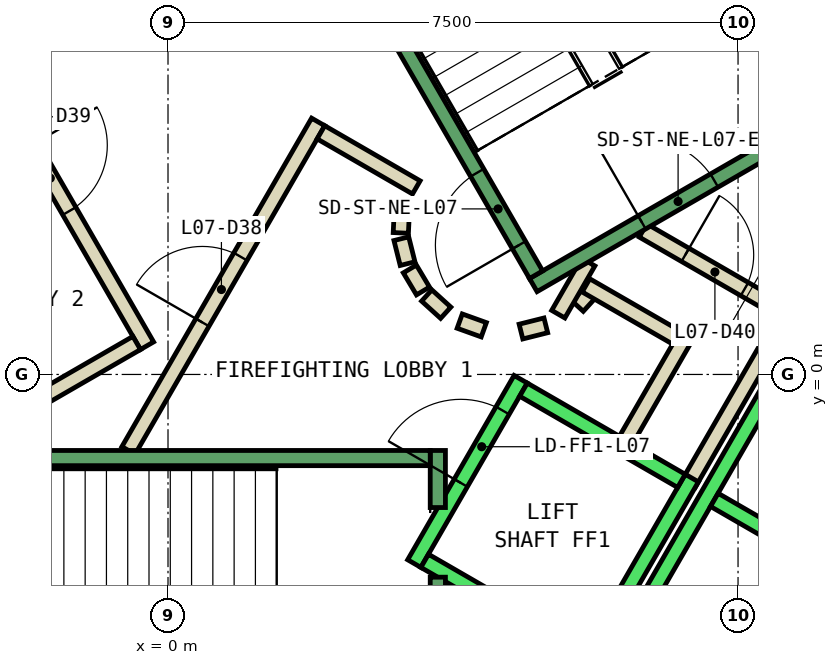
"""IFC4 building model, lengths in metres.
Left out: names, types, materials, properties, quantities, classifications, styles, units other than length and angle.
Written with IfcOpenShell. Run it as: python <this file> out.ifc"""

import sys

from ifc_helpers import new_model, si_unit, direction, frame, frame_2d, origin, place, context, subcontext, project, spatial, polyline, rectangle, outline, extrude, element, fill, save


model = new_model("IFC4")
c1 = context("Model", 3, precision=1e-05, world=origin(), true_north=direction((0.0, 1.0)))
c2 = subcontext(c1, "Body", "Model", "MODEL_VIEW")
j1 = project(units=[si_unit("LENGTHUNIT", "METRE"), si_unit("PLANEANGLEUNIT", "RADIAN")], contexts=[c1])
p1 = place(None, origin())
s1 = spatial("IfcSite", under=j1, at=p1, CompositionType="ELEMENT")
p2 = place(p1, origin())
s2 = spatial("IfcBuilding", under=s1, at=p2, CompositionType="ELEMENT")
p3 = place(p2, frame((0.0, 0.0, 39.2)))
s3 = spatial("IfcBuildingStorey", under=s2, at=p3, CompositionType="ELEMENT", Elevation=39.2)
p4 = place(p3, frame((0.0, 0.0, -0.4)))
e1 = element("IfcWall", 1, at=p4, inside=s3, PredefinedType="SHEAR", context=c2, shape_type="SweptSolid", body=[
    extrude(outline(polyline([(8.517, 11.748), (7.651, 11.248), (12.702, 2.5), (13.856, 2.5), (8.517, 11.748)])), origin(), (0.0, 0.0, 1.0), 4.2),
])
p5 = place(p3, frame((5.39, 0.898, 0.0), z_axis=(0.0, 0.0, 1.0), x_axis=(0.673828488714, 0.738887791073, 0.0)))
e2 = element("IfcWall", 2, at=p5, inside=s3, PredefinedType="PARTITIONING", context=c2, shape_type="SweptSolid", body=[
    extrude(rectangle(XDim=0.263, YDim=0.2, at=frame_2d((0.131, 0.0))), origin(), (0.0, 0.0, 1.0), 3.8),
])
p6 = place(p3, frame((5.499, 1.172, 0.0), z_axis=(0.0, 0.0, 1.0), x_axis=(0.866333505267, -0.499465972466, 0.0)))
e3 = element("IfcWall", 3, at=p6, inside=s3, PredefinedType="PARTITIONING", context=c2, shape_type="SweptSolid", body=[
    extrude(rectangle(XDim=1.374, YDim=0.2, at=frame_2d((0.687, 0.0))), origin(), (0.0, 0.0, 1.0), 3.8),
])
p7 = place(p3, frame((6.826, 0.522, 0.0), z_axis=(0.0, 0.0, 1.0), x_axis=(-0.500016722714, -0.866015748706, 0.0)))
e4 = element("IfcWall", 4, at=p7, inside=s3, PredefinedType="PARTITIONING", context=c2, shape_type="SweptSolid", body=[
    extrude(rectangle(XDim=1.7, YDim=0.2, at=frame_2d((0.85, 0.0))), origin(), (0.0, 0.0, 1.0), 3.8),
])
p8 = place(p3, frame((6.25, 1.894, 0.0), z_axis=(0.0, 0.0, 1.0), x_axis=(0.866043184279, -0.499969202016, 0.0)))
e5 = element("IfcWall", 5, at=p8, inside=s3, PredefinedType="PARTITIONING", context=c2, shape_type="SweptSolid", body=[
    extrude(rectangle(XDim=2.084, YDim=0.2, at=frame_2d((1.042, 0.0))), origin(), (0.0, 0.0, 1.0), 3.8),
])
p9 = place(p8, frame((0.642, 0.0, 0.0)))
e6 = element("IfcOpeningElement", 6, at=p9, cuts=e5, PredefinedType="OPENING", context=c2, shape_type="SweptSolid", body=[
    extrude(rectangle(XDim=0.9, YDim=2.1, at=frame_2d((0.45, 1.05))), frame((0.0, 0.11, 0.0), z_axis=(0.0, -1.0, 0.0), x_axis=(1.0, 0.0, 0.0)), (0.0, 0.0, 1.0), 0.22),
])
p10 = place(p3, frame((8.192, 0.888, 0.0), z_axis=(0.0, 0.0, 1.0), x_axis=(-0.499940625693, -0.866059680843, 0.0)))
e7 = element("IfcWall", 7, at=p10, inside=s3, PredefinedType="PARTITIONING", context=c2, shape_type="SweptSolid", body=[
    extrude(rectangle(XDim=2.68, YDim=0.2, at=frame_2d((1.34, 0.0))), origin(), (0.0, 0.0, 1.0), 3.8),
])
p11 = place(p3, frame((5.135, 0.793, 0.0), z_axis=(0.0, 0.0, 1.0), x_axis=(0.499526442893, 0.866298639529, 0.0)))
e8 = element("IfcWall", 8, at=p11, inside=s3, PredefinedType="PARTITIONING", context=c2, shape_type="SweptSolid", body=[
    extrude(rectangle(XDim=0.791, YDim=0.2, at=frame_2d((0.396, 0.0))), origin(), (0.0, 0.0, 1.0), 3.8),
])
p12 = place(p3, frame((-0.52, -1.0, 0.0), z_axis=(0.0, 0.0, 1.0), x_axis=(0.50011622646, 0.865958290007, 0.0)))
e9 = element("IfcWall", 9, at=p12, inside=s3, PredefinedType="PARTITIONING", context=c2, shape_type="SweptSolid", body=[
    extrude(rectangle(XDim=4.991, YDim=0.2, at=frame_2d((2.496, 0.0))), origin(), (0.0, 0.0, 1.0), 3.8),
])
p13 = place(p12, frame((1.945, 0.0, 0.0)))
e10 = element("IfcOpeningElement", 10, at=p13, cuts=e9, PredefinedType="OPENING", context=c2, shape_type="SweptSolid", body=[
    extrude(rectangle(XDim=1.0, YDim=2.1, at=frame_2d((0.5, 1.05))), frame((0.0, 0.11, 0.0), z_axis=(0.0, -1.0, 0.0), x_axis=(1.0, 0.0, 0.0)), (0.0, 0.0, 1.0), 0.22),
])
p14 = place(p3, frame((2.012, 3.186, 0.0), z_axis=(0.0, 0.0, 1.0), x_axis=(0.865891012941, -0.500232699559, 0.0)))
e11 = element("IfcWall", 11, at=p14, inside=s3, PredefinedType="PARTITIONING", context=c2, shape_type="SweptSolid", body=[
    extrude(rectangle(XDim=1.449, YDim=0.2, at=frame_2d((0.725, 0.0))), origin(), (0.0, 0.0, 1.0), 3.8),
])
p15 = place(p3, frame((3.079, 2.199, 0.0), z_axis=(0.0, 0.0, 1.0), x_axis=(-0.047771483479, -0.998858290933, 0.0)))
e12 = element("IfcWall", 12, at=p15, inside=s3, PredefinedType="PARTITIONING", context=c2, shape_type="SweptSolid", body=[
    extrude(rectangle(XDim=0.337, YDim=0.2, at=frame_2d((0.169, 0.0))), origin(), (0.0, 0.0, 1.0), 3.8),
])
p16 = place(p3, frame((3.07, 1.786, 0.0), z_axis=(0.0, 0.0, 1.0), x_axis=(0.242705583207, -0.970099994784, 0.0)))
e13 = element("IfcWall", 13, at=p16, inside=s3, PredefinedType="PARTITIONING", context=c2, shape_type="SweptSolid", body=[
    extrude(rectangle(XDim=0.338, YDim=0.2, at=frame_2d((0.169, 0.0))), origin(), (0.0, 0.0, 1.0), 3.8),
])
for number, where, z_axis, x_axis in (
    (14, (3.182, 1.388, 0.0), (0.0, 0.0, 1.0), (0.512, -0.859, 0.0)),
    (15, (3.404, 1.039, 0.0), (0.0, 0.0, 1.0), (0.74, -0.672, 0.0)),
):
    element("IfcWall", number, at=place(p3, frame(where, z_axis=z_axis, x_axis=x_axis)), inside=s3, PredefinedType="PARTITIONING", context=c2, shape_type="SweptSolid", body=[
        extrude(rectangle(XDim=0.338, YDim=0.2, at=frame_2d((0.169, 0.0))), origin(), (0.0, 0.0, 1.0), 3.8),
    ])
p17 = place(p3, frame((3.838, 0.702, 0.0), z_axis=(0.0, 0.0, 1.0), x_axis=(0.941035081519, -0.338308993895, 0.0)))
e16 = element("IfcWall", 16, at=p17, inside=s3, PredefinedType="PARTITIONING", context=c2, shape_type="SweptSolid", body=[
    extrude(rectangle(XDim=0.337, YDim=0.2, at=frame_2d((0.168, 0.0))), origin(), (0.0, 0.0, 1.0), 3.8),
])
p18 = place(p3, frame((4.644, 0.564, 0.0), z_axis=(0.0, 0.0, 1.0), x_axis=(0.969929076366, 0.243387729394, 0.0)))
e17 = element("IfcWall", 17, at=p18, inside=s3, PredefinedType="PARTITIONING", context=c2, shape_type="SweptSolid", body=[
    extrude(rectangle(XDim=0.337, YDim=0.2, at=frame_2d((0.168, 0.0))), origin(), (0.0, 0.0, 1.0), 3.8),
])
p19 = place(p3, frame((-2.771, 4.7, 0.0), z_axis=(0.0, 0.0, 1.0), x_axis=(0.499969479948, -0.866043023828, 0.0)))
e18 = element("IfcWall", 18, at=p19, inside=s3, PredefinedType="PARTITIONING", context=c2, shape_type="SweptSolid", body=[
    extrude(rectangle(XDim=4.99, YDim=0.2, at=frame_2d((2.495, 0.0))), origin(), (0.0, 0.0, 1.0), 3.8),
])
p20 = place(p19, frame((1.945, 0.0, 0.0)))
e19 = element("IfcOpeningElement", 19, at=p20, cuts=e18, PredefinedType="OPENING", context=c2, shape_type="SweptSolid", body=[
    extrude(rectangle(XDim=1.0, YDim=2.1, at=frame_2d((0.5, 1.05))), frame((0.0, 0.11, 0.0), z_axis=(0.0, -1.0, 0.0), x_axis=(1.0, 0.0, 0.0)), (0.0, 0.0, 1.0), 0.22),
])
p21 = place(p3, frame((-0.412, 0.414, 0.0), z_axis=(0.0, 0.0, 1.0), x_axis=(-0.866017369001, -0.500013916395, 0.0)))
e20 = element("IfcWall", 20, at=p21, inside=s3, PredefinedType="PARTITIONING", context=c2, shape_type="SweptSolid", body=[
    extrude(rectangle(XDim=1.45, YDim=0.2, at=frame_2d((0.725, 0.0))), origin(), (0.0, 0.0, 1.0), 3.8),
])
p22 = place(p3, frame((3.24, -2.488, 0.0), z_axis=(0.0, 0.0, 1.0), x_axis=(0.49994636267, 0.866056369097, 0.0)))
e21 = element("IfcWall", 21, at=p22, inside=s3, PredefinedType="STANDARD", context=c2, shape_type="SweptSolid", body=[
    extrude(rectangle(XDim=2.8, YDim=0.2, at=frame_2d((1.4, 0.0))), origin(), (0.0, 0.0, 1.0), 3.8),
])
p23 = place(p22, frame((1.225, 0.0, 0.0)))
e22 = element("IfcOpeningElement", 22, at=p23, cuts=e21, PredefinedType="OPENING", context=c2, shape_type="SweptSolid", body=[
    extrude(rectangle(XDim=1.1, YDim=2.1, at=frame_2d((0.55, 1.05))), frame((0.0, 0.11, 0.0), z_axis=(0.0, -1.0, 0.0), x_axis=(1.0, 0.0, 0.0)), (0.0, 0.0, 1.0), 0.22),
])
p24 = place(p3, frame((5.492, -3.788, 0.0), z_axis=(0.0, 0.0, 1.0), x_axis=(0.500011755427, 0.866018616679, 0.0)))
e23 = element("IfcWall", 23, at=p24, inside=s3, PredefinedType="STANDARD", context=c2, shape_type="SweptSolid", body=[
    extrude(rectangle(XDim=2.8, YDim=0.2, at=frame_2d((1.4, 0.0))), origin(), (0.0, 0.0, 1.0), 3.8),
])
p25 = place(p3, frame((3.377, -2.452, 0.0), z_axis=(0.0, 0.0, 1.0), x_axis=(0.865955154139, -0.50012165622, 0.0)))
e24 = element("IfcWall", 24, at=p25, inside=s3, PredefinedType="STANDARD", context=c2, shape_type="SweptSolid", body=[
    extrude(rectangle(XDim=2.4, YDim=0.2, at=frame_2d((1.2, 0.0))), origin(), (0.0, 0.0, 1.0), 3.8),
])
p26 = place(p3, frame((4.677, -0.2, 0.0), z_axis=(0.0, 0.0, 1.0), x_axis=(0.865973769406, -0.500089422704, 0.0)))
e25 = element("IfcWall", 25, at=p26, inside=s3, PredefinedType="STANDARD", context=c2, shape_type="SweptSolid", body=[
    extrude(rectangle(XDim=2.399, YDim=0.2, at=frame_2d((1.2, 0.0))), origin(), (0.0, 0.0, 1.0), 3.8),
])
p27 = place(p3, frame((4.451, -6.19, 0.0), z_axis=(0.0, 0.0, 1.0), x_axis=(0.50000090737, 0.866024879913, 0.0)))
e26 = element("IfcWall", 26, at=p27, inside=s3, PredefinedType="STANDARD", context=c2, shape_type="SweptSolid", body=[
    extrude(rectangle(XDim=10.6, YDim=0.2, at=frame_2d((5.3, 0.0))), origin(), (0.0, 0.0, 1.0), 3.8),
])
p28 = place(p3, frame((7.188, -1.65, 0.0), z_axis=(0.0, 0.0, 1.0), x_axis=(0.866022959057, -0.500004234368, 0.0)))
e27 = element("IfcWall", 27, at=p28, inside=s3, PredefinedType="STANDARD", context=c2, shape_type="SweptSolid", body=[
    extrude(rectangle(XDim=2.5, YDim=0.2, at=frame_2d((1.25, 0.0))), origin(), (0.0, 0.0, 1.0), 3.8),
])
p29 = place(p3, frame((3.55, -2.667, 0.0), z_axis=(0.0, 0.0, 1.0), x_axis=(0.0, -1.0, 0.0)))
e28 = element("IfcWall", 28, at=p29, inside=s3, PredefinedType="STANDARD", context=c2, shape_type="SweptSolid", body=[
    extrude(rectangle(XDim=2.733, YDim=0.2, at=frame_2d((1.366, 0.0))), origin(), (0.0, 0.0, 1.0), 3.8),
])
p30 = place(p3, frame((3.55, -1.0, 0.0), z_axis=(0.0, 0.0, 1.0), x_axis=(0.0, -1.0, 0.0)))
e29 = element("IfcWall", 29, at=p30, inside=s3, PredefinedType="STANDARD", context=c2, shape_type="SweptSolid", body=[
    extrude(rectangle(XDim=0.751, YDim=0.2, at=frame_2d((0.375, 0.0))), origin(), (0.0, 0.0, 1.0), 3.8),
])
p31 = place(p3, frame((-3.45, -1.1, 0.0), z_axis=(0.0, 0.0, 1.0), x_axis=(1.0, 0.0, 0.0)))
e30 = element("IfcWall", 30, at=p31, inside=s3, PredefinedType="STANDARD", context=c2, shape_type="SweptSolid", body=[
    extrude(rectangle(XDim=6.9, YDim=0.2, at=frame_2d((3.45, 0.0))), origin(), (0.0, 0.0, 1.0), 3.8),
])
p32 = place(p31, frame((0.45, 0.0, 0.0)))
e31 = element("IfcOpeningElement", 31, at=p32, cuts=e30, PredefinedType="OPENING", context=c2, shape_type="SweptSolid", body=[
    extrude(rectangle(XDim=1.1, YDim=2.2, at=frame_2d((0.55, 1.1))), frame((0.0, 0.11, 0.0), z_axis=(0.0, -1.0, 0.0), x_axis=(1.0, 0.0, 0.0)), (0.0, 0.0, 1.0), 0.22),
])
p33 = place(p3, frame((4.806, 1.176, 0.0), z_axis=(0.0, 0.0, 1.0), x_axis=(0.866059941101, 0.499940174841, 0.0)))
e32 = element("IfcWall", 32, at=p33, inside=s3, PredefinedType="STANDARD", context=c2, shape_type="SweptSolid", body=[
    extrude(rectangle(XDim=4.4, YDim=0.2, at=frame_2d((2.2, 0.0))), origin(), (0.0, 0.0, 1.0), 3.8),
])
p34 = place(p33, frame((1.65, 0.0, 0.0)))
e33 = element("IfcOpeningElement", 33, at=p34, cuts=e32, PredefinedType="OPENING", context=c2, shape_type="SweptSolid", body=[
    extrude(rectangle(XDim=1.1, YDim=2.2, at=frame_2d((0.55, 1.1))), frame((0.0, 0.11, 0.0), z_axis=(0.0, -1.0, 0.0), x_axis=(1.0, 0.0, 0.0)), (0.0, 0.0, 1.0), 0.22),
])
p35 = place(p3, frame((4.843, 1.312, 0.0), z_axis=(0.0, 0.0, 1.0), x_axis=(-0.499963383562, 0.866046543262, 0.0)))
e34 = element("IfcWall", 34, at=p35, inside=s3, PredefinedType="STANDARD", context=c2, shape_type="SweptSolid", body=[
    extrude(rectangle(XDim=6.9, YDim=0.2, at=frame_2d((3.45, 0.0))), origin(), (0.0, 0.0, 1.0), 3.8),
])
p36 = place(p35, frame((0.45, 0.0, 0.0)))
e35 = element("IfcOpeningElement", 35, at=p36, cuts=e34, PredefinedType="OPENING", context=c2, shape_type="SweptSolid", body=[
    extrude(rectangle(XDim=1.1, YDim=2.2, at=frame_2d((0.55, 1.1))), frame((0.0, 0.11, 0.0), z_axis=(0.0, -1.0, 0.0), x_axis=(1.0, 0.0, 0.0)), (0.0, 0.0, 1.0), 0.22),
])
p37 = place(p3, frame((8.48, 3.412, 0.0), z_axis=(0.0, 0.0, 1.0), x_axis=(-0.499978703459, 0.866037698999, 0.0)))
e36 = element("IfcWall", 36, at=p37, inside=s3, PredefinedType="STANDARD", context=c2, shape_type="SweptSolid", body=[
    extrude(rectangle(XDim=6.9, YDim=0.2, at=frame_2d((3.45, 0.0))), origin(), (0.0, 0.0, 1.0), 3.8),
])
p38 = place(p3, frame((-1.393, 7.288, 0.0), z_axis=(0.0, 0.0, 1.0), x_axis=(-0.499963383562, -0.866046543262, 0.0)))
e37 = element("IfcWall", 37, at=p38, inside=s3, PredefinedType="STANDARD", context=c2, shape_type="SweptSolid", body=[
    extrude(rectangle(XDim=6.9, YDim=0.2, at=frame_2d((3.45, 0.0))), origin(), (0.0, 0.0, 1.0), 3.8),
])
p39 = place(p38, frame((0.45, 0.0, 0.0)))
e38 = element("IfcOpeningElement", 38, at=p39, cuts=e37, PredefinedType="OPENING", context=c2, shape_type="SweptSolid", body=[
    extrude(rectangle(XDim=1.1, YDim=2.2, at=frame_2d((0.55, 1.1))), frame((0.0, 0.11, 0.0), z_axis=(0.0, -1.0, 0.0), x_axis=(1.0, 0.0, 0.0)), (0.0, 0.0, 1.0), 0.22),
])
p40 = place(p13, origin())
e39 = element("IfcDoor", 39, at=p40, inside=s3, OperationType="SINGLE_SWING_LEFT", PredefinedType="DOOR", context=c2, shape_type="SweptSolid", body=[
    extrude(rectangle(XDim=1.0, YDim=2.1, at=frame_2d((0.5, 1.05))), frame((0.0, 0.025, 0.0), z_axis=(0.0, -1.0, 0.0), x_axis=(1.0, 0.0, 0.0)), (0.0, 0.0, 1.0), 0.05),
])
fill(e10, e39)
p41 = place(p20, origin())
e40 = element("IfcDoor", 40, at=p41, inside=s3, OperationType="SINGLE_SWING_RIGHT", PredefinedType="DOOR", context=c2, shape_type="SweptSolid", body=[
    extrude(rectangle(XDim=1.0, YDim=2.1, at=frame_2d((0.5, 1.05))), frame((0.0, 0.025, 0.0), z_axis=(0.0, -1.0, 0.0), x_axis=(1.0, 0.0, 0.0)), (0.0, 0.0, 1.0), 0.05),
])
fill(e19, e40)
p42 = place(p9, origin())
e41 = element("IfcDoor", 41, at=p42, inside=s3, OperationType="SINGLE_SWING_LEFT", PredefinedType="DOOR", context=c2, shape_type="SweptSolid", body=[
    extrude(rectangle(XDim=0.9, YDim=2.1, at=frame_2d((0.45, 1.05))), frame((0.0, 0.025, 0.0), z_axis=(0.0, -1.0, 0.0), x_axis=(1.0, 0.0, 0.0)), (0.0, 0.0, 1.0), 0.05),
])
fill(e6, e41)
p43 = place(p23, origin())
e42 = element("IfcDoor", 42, at=p43, inside=s3, OperationType="SLIDING_TO_LEFT", PredefinedType="DOOR", context=c2, shape_type="SweptSolid", body=[
    extrude(rectangle(XDim=1.1, YDim=2.1, at=frame_2d((0.55, 1.05))), frame((0.0, 0.025, 0.0), z_axis=(0.0, -1.0, 0.0), x_axis=(1.0, 0.0, 0.0)), (0.0, 0.0, 1.0), 0.05),
])
fill(e22, e42)
p44 = place(p36, origin())
e43 = element("IfcDoor", 43, at=p44, inside=s3, OperationType="SINGLE_SWING_LEFT", PredefinedType="DOOR", context=c2, shape_type="SweptSolid", body=[
    extrude(rectangle(XDim=1.1, YDim=2.2, at=frame_2d((0.55, 1.1))), frame((0.0, 0.025, 0.0), z_axis=(0.0, -1.0, 0.0), x_axis=(1.0, 0.0, 0.0)), (0.0, 0.0, 1.0), 0.05),
])
fill(e35, e43)
p45 = place(p34, origin())
e44 = element("IfcDoor", 44, at=p45, inside=s3, OperationType="SINGLE_SWING_LEFT", PredefinedType="DOOR", context=c2, shape_type="SweptSolid", body=[
    extrude(rectangle(XDim=1.1, YDim=2.2, at=frame_2d((0.55, 1.1))), frame((0.0, 0.025, 0.0), z_axis=(0.0, -1.0, 0.0), x_axis=(1.0, 0.0, 0.0)), (0.0, 0.0, 1.0), 0.05),
])
fill(e33, e44)
save(model, sys.argv[1])
